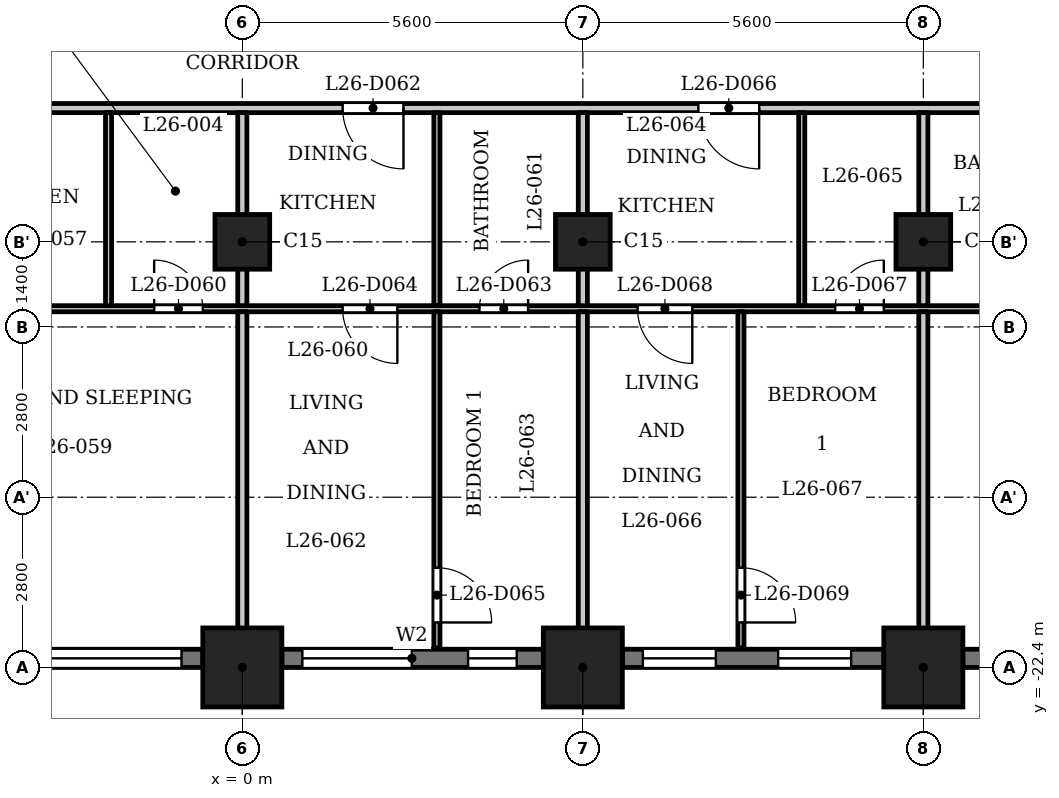
"""IFC4 building model, lengths in metres.
Left out: names, types, materials, properties, quantities, classifications, styles, units other than length and angle.
Written with IfcOpenShell. Run it as: python <this file> out.ifc"""

import sys

from ifc_helpers import new_model, si_unit, direction, frame, frame_2d, origin, origin_2d, place, context, subcontext, project, spatial, rectangle, extrude, element, fill, save


model = new_model("IFC4")
c1 = context("Model", 3, precision=1e-05, world=origin(), true_north=direction((0.0, 1.0)))
c2 = subcontext(c1, "Body", "Model", "MODEL_VIEW")
j1 = project(units=[si_unit("LENGTHUNIT", "METRE"), si_unit("PLANEANGLEUNIT", "RADIAN")], contexts=[c1])
p1 = place(None, origin())
s1 = spatial("IfcSite", under=j1, at=p1, CompositionType="ELEMENT")
p2 = place(p1, origin())
s2 = spatial("IfcBuilding", under=s1, at=p2, CompositionType="ELEMENT")
p3 = place(p2, frame((0.0, 0.0, 104.3)))
s3 = spatial("IfcBuildingStorey", under=s2, at=p3, CompositionType="ELEMENT", Elevation=104.3)
for number, where, z_axis, x_axis in (
    (1, (0.0, -22.4, 0.0), (0.0, 0.0, 1.0), (1.0, 0.0, 0.0)),
    (2, (5.6, -22.4, 0.0), (0.0, 0.0, 1.0), (1.0, 0.0, 0.0)),
    (3, (11.2, -22.4, 0.0), (0.0, 0.0, 1.0), (1.0, 0.0, 0.0)),
):
    element("IfcColumn", number, at=place(p3, frame(where, z_axis=z_axis, x_axis=x_axis)), inside=s3, PredefinedType="COLUMN", context=c2, shape_type="SweptSolid", body=[
        extrude(rectangle(XDim=1.3, YDim=1.3, at=origin_2d()), origin(), (0.0, 0.0, 1.0), 3.5),
    ])
for number, where, z_axis, x_axis in (
    (4, (0.0, -15.4, 0.0), (0.0, 0.0, 1.0), (1.0, 0.0, 0.0)),
    (5, (5.6, -15.4, 0.0), (0.0, 0.0, 1.0), (1.0, 0.0, 0.0)),
    (6, (11.2, -15.4, 0.0), (0.0, 0.0, 1.0), (1.0, 0.0, 0.0)),
):
    element("IfcColumn", number, at=place(p3, frame(where, z_axis=z_axis, x_axis=x_axis)), inside=s3, PredefinedType="COLUMN", context=c2, shape_type="SweptSolid", body=[
        extrude(rectangle(XDim=0.9, YDim=0.9, at=origin_2d()), origin(), (0.0, 0.0, 1.0), 3.5),
    ])
p4 = place(p3, frame((-4.95, -22.25, 0.0), z_axis=(0.0, 0.0, 1.0), x_axis=(1.0, 0.0, 0.0)))
e7 = element("IfcWall", 7, at=p4, inside=s3, PredefinedType="SOLIDWALL", context=c2, shape_type="SweptSolid", body=[
    extrude(rectangle(XDim=4.3, YDim=0.3, at=frame_2d((2.15, 0.0))), origin(), (0.0, 0.0, 1.0), 2.4),
])
p5 = place(p4, frame((0.35, 0.0, 1.2)))
e8 = element("IfcOpeningElement", 8, at=p5, cuts=e7, PredefinedType="OPENING", context=c2, shape_type="SweptSolid", body=[
    extrude(rectangle(XDim=3.6, YDim=0.95, at=frame_2d((1.8, 0.475))), frame((0.0, 0.16, 0.0), z_axis=(0.0, -1.0, 0.0), x_axis=(1.0, 0.0, 0.0)), (0.0, 0.0, 1.0), 0.32),
])
p6 = place(p3, frame((0.65, -22.25, 0.0), z_axis=(0.0, 0.0, 1.0), x_axis=(1.0, 0.0, 0.0)))
e9 = element("IfcWall", 9, at=p6, inside=s3, PredefinedType="SOLIDWALL", context=c2, shape_type="SweptSolid", body=[
    extrude(rectangle(XDim=4.3, YDim=0.3, at=frame_2d((2.15, 0.0))), origin(), (0.0, 0.0, 1.0), 2.4),
])
p7 = place(p6, frame((0.337, 0.0, 0.9)))
e10 = element("IfcOpeningElement", 10, at=p7, cuts=e9, PredefinedType="OPENING", context=c2, shape_type="SweptSolid", body=[
    extrude(rectangle(XDim=1.8, YDim=1.25, at=frame_2d((0.9, 0.625))), frame((0.0, 0.16, 0.0), z_axis=(0.0, -1.0, 0.0), x_axis=(1.0, 0.0, 0.0)), (0.0, 0.0, 1.0), 0.32),
])
p8 = place(p6, frame((3.062, 0.0, 0.6)))
e11 = element("IfcOpeningElement", 11, at=p8, cuts=e9, PredefinedType="OPENING", context=c2, shape_type="SweptSolid", body=[
    extrude(rectangle(XDim=0.8, YDim=1.55, at=frame_2d((0.4, 0.775))), frame((0.0, 0.16, 0.0), z_axis=(0.0, -1.0, 0.0), x_axis=(1.0, 0.0, 0.0)), (0.0, 0.0, 1.0), 0.32),
])
p9 = place(p3, frame((6.25, -22.25, 0.0), z_axis=(0.0, 0.0, 1.0), x_axis=(1.0, 0.0, 0.0)))
e12 = element("IfcWall", 12, at=p9, inside=s3, PredefinedType="SOLIDWALL", context=c2, shape_type="SweptSolid", body=[
    extrude(rectangle(XDim=4.3, YDim=0.3, at=frame_2d((2.15, 0.0))), origin(), (0.0, 0.0, 1.0), 2.4),
])
p10 = place(p9, frame((0.337, 0.0, 0.6)))
e13 = element("IfcOpeningElement", 13, at=p10, cuts=e12, PredefinedType="OPENING", context=c2, shape_type="SweptSolid", body=[
    extrude(rectangle(XDim=1.2, YDim=1.55, at=frame_2d((0.6, 0.775))), frame((0.0, 0.16, 0.0), z_axis=(0.0, -1.0, 0.0), x_axis=(1.0, 0.0, 0.0)), (0.0, 0.0, 1.0), 0.32),
])
p11 = place(p9, frame((2.562, 0.0, 0.6)))
e14 = element("IfcOpeningElement", 14, at=p11, cuts=e12, PredefinedType="OPENING", context=c2, shape_type="SweptSolid", body=[
    extrude(rectangle(XDim=1.2, YDim=1.55, at=frame_2d((0.6, 0.775))), frame((0.0, 0.16, 0.0), z_axis=(0.0, -1.0, 0.0), x_axis=(1.0, 0.0, 0.0)), (0.0, 0.0, 1.0), 0.32),
])
p12 = place(p3, frame((11.85, -22.25, 0.0), z_axis=(0.0, 0.0, 1.0), x_axis=(1.0, 0.0, 0.0)))
e15 = element("IfcWall", 15, at=p12, inside=s3, PredefinedType="SOLIDWALL", context=c2, shape_type="SweptSolid", body=[
    extrude(rectangle(XDim=4.3, YDim=0.3, at=frame_2d((2.15, 0.0))), origin(), (0.0, 0.0, 1.0), 2.4),
])
p13 = place(p12, frame((0.35, 0.0, 1.2)))
e16 = element("IfcOpeningElement", 16, at=p13, cuts=e15, PredefinedType="OPENING", context=c2, shape_type="SweptSolid", body=[
    extrude(rectangle(XDim=3.6, YDim=0.95, at=frame_2d((1.8, 0.475))), frame((0.0, 0.16, 0.0), z_axis=(0.0, -1.0, 0.0), x_axis=(1.0, 0.0, 0.0)), (0.0, 0.0, 1.0), 0.32),
])
p14 = place(p3, frame((-16.725, -16.5, 0.0), z_axis=(0.0, 0.0, 1.0), x_axis=(1.0, 0.0, 0.0)))
e17 = element("IfcWall", 17, at=p14, inside=s3, PredefinedType="PARTITIONING", context=c2, shape_type="SweptSolid", body=[
    extrude(rectangle(XDim=33.45, YDim=0.1, at=frame_2d((16.725, 0.0))), origin(), (0.0, 0.0, 1.0), 3.2),
])
p15 = place(p14, frame((4.075, 0.0, 0.0)))
e18 = element("IfcOpeningElement", 18, at=p15, cuts=e17, PredefinedType="OPENING", context=c2, shape_type="SweptSolid", body=[
    extrude(rectangle(XDim=0.8, YDim=2.1, at=frame_2d((0.4, 1.05))), frame((0.0, 0.06, 0.0), z_axis=(0.0, -1.0, 0.0), x_axis=(1.0, 0.0, 0.0)), (0.0, 0.0, 1.0), 0.12),
])
p16 = place(p14, frame((1.075, 0.0, 0.0)))
e19 = element("IfcOpeningElement", 19, at=p16, cuts=e17, PredefinedType="OPENING", context=c2, shape_type="SweptSolid", body=[
    extrude(rectangle(XDim=0.9, YDim=2.1, at=frame_2d((0.45, 1.05))), frame((0.0, 0.06, 0.0), z_axis=(0.0, -1.0, 0.0), x_axis=(1.0, 0.0, 0.0)), (0.0, 0.0, 1.0), 0.12),
])
p17 = place(p14, frame((9.675, 0.0, 0.0)))
e20 = element("IfcOpeningElement", 20, at=p17, cuts=e17, PredefinedType="OPENING", context=c2, shape_type="SweptSolid", body=[
    extrude(rectangle(XDim=0.8, YDim=2.1, at=frame_2d((0.4, 1.05))), frame((0.0, 0.06, 0.0), z_axis=(0.0, -1.0, 0.0), x_axis=(1.0, 0.0, 0.0)), (0.0, 0.0, 1.0), 0.12),
])
p18 = place(p14, frame((7.675, 0.0, 0.0)))
e21 = element("IfcOpeningElement", 21, at=p18, cuts=e17, PredefinedType="OPENING", context=c2, shape_type="SweptSolid", body=[
    extrude(rectangle(XDim=0.9, YDim=2.1, at=frame_2d((0.45, 1.05))), frame((0.0, 0.06, 0.0), z_axis=(0.0, -1.0, 0.0), x_axis=(1.0, 0.0, 0.0)), (0.0, 0.0, 1.0), 0.12),
])
p19 = place(p14, frame((15.275, 0.0, 0.0)))
e22 = element("IfcOpeningElement", 22, at=p19, cuts=e17, PredefinedType="OPENING", context=c2, shape_type="SweptSolid", body=[
    extrude(rectangle(XDim=0.8, YDim=2.1, at=frame_2d((0.4, 1.05))), frame((0.0, 0.06, 0.0), z_axis=(0.0, -1.0, 0.0), x_axis=(1.0, 0.0, 0.0)), (0.0, 0.0, 1.0), 0.12),
])
p20 = place(p14, frame((11.775, 0.0, 0.0)))
e23 = element("IfcOpeningElement", 23, at=p20, cuts=e17, PredefinedType="OPENING", context=c2, shape_type="SweptSolid", body=[
    extrude(rectangle(XDim=0.9, YDim=2.1, at=frame_2d((0.45, 1.05))), frame((0.0, 0.06, 0.0), z_axis=(0.0, -1.0, 0.0), x_axis=(1.0, 0.0, 0.0)), (0.0, 0.0, 1.0), 0.12),
])
p21 = place(p14, frame((20.625, 0.0, 0.0)))
e24 = element("IfcOpeningElement", 24, at=p21, cuts=e17, PredefinedType="OPENING", context=c2, shape_type="SweptSolid", body=[
    extrude(rectangle(XDim=0.8, YDim=2.1, at=frame_2d((0.4, 1.05))), frame((0.0, 0.06, 0.0), z_axis=(0.0, -1.0, 0.0), x_axis=(1.0, 0.0, 0.0)), (0.0, 0.0, 1.0), 0.12),
])
p22 = place(p14, frame((18.375, 0.0, 0.0)))
e25 = element("IfcOpeningElement", 25, at=p22, cuts=e17, PredefinedType="OPENING", context=c2, shape_type="SweptSolid", body=[
    extrude(rectangle(XDim=0.9, YDim=2.1, at=frame_2d((0.45, 1.05))), frame((0.0, 0.06, 0.0), z_axis=(0.0, -1.0, 0.0), x_axis=(1.0, 0.0, 0.0)), (0.0, 0.0, 1.0), 0.12),
])
p23 = place(p14, frame((26.475, 0.0, 0.0)))
e26 = element("IfcOpeningElement", 26, at=p23, cuts=e17, PredefinedType="OPENING", context=c2, shape_type="SweptSolid", body=[
    extrude(rectangle(XDim=0.8, YDim=2.1, at=frame_2d((0.4, 1.05))), frame((0.0, 0.06, 0.0), z_axis=(0.0, -1.0, 0.0), x_axis=(1.0, 0.0, 0.0)), (0.0, 0.0, 1.0), 0.12),
])
p24 = place(p14, frame((23.225, 0.0, 0.0)))
e27 = element("IfcOpeningElement", 27, at=p24, cuts=e17, PredefinedType="OPENING", context=c2, shape_type="SweptSolid", body=[
    extrude(rectangle(XDim=0.9, YDim=2.1, at=frame_2d((0.45, 1.05))), frame((0.0, 0.06, 0.0), z_axis=(0.0, -1.0, 0.0), x_axis=(1.0, 0.0, 0.0)), (0.0, 0.0, 1.0), 0.12),
])
p25 = place(p14, frame((29.475, 0.0, 0.0)))
e28 = element("IfcOpeningElement", 28, at=p25, cuts=e17, PredefinedType="OPENING", context=c2, shape_type="SweptSolid", body=[
    extrude(rectangle(XDim=0.8, YDim=2.1, at=frame_2d((0.4, 1.05))), frame((0.0, 0.06, 0.0), z_axis=(0.0, -1.0, 0.0), x_axis=(1.0, 0.0, 0.0)), (0.0, 0.0, 1.0), 0.12),
])
p26 = place(p14, frame((31.825, 0.0, 0.0)))
e29 = element("IfcOpeningElement", 29, at=p26, cuts=e17, PredefinedType="OPENING", context=c2, shape_type="SweptSolid", body=[
    extrude(rectangle(XDim=0.9, YDim=2.1, at=frame_2d((0.45, 1.05))), frame((0.0, 0.06, 0.0), z_axis=(0.0, -1.0, 0.0), x_axis=(1.0, 0.0, 0.0)), (0.0, 0.0, 1.0), 0.12),
])
p27 = place(p3, frame((-17.4, -13.2, 0.0), z_axis=(0.0, 0.0, 1.0), x_axis=(1.0, 0.0, 0.0)))
e30 = element("IfcWall", 30, at=p27, inside=s3, PredefinedType="PARTITIONING", context=c2, shape_type="SweptSolid", body=[
    extrude(rectangle(XDim=34.8, YDim=0.15, at=frame_2d((17.4, 0.0))), origin(), (0.0, 0.0, 1.0), 3.2),
])
p28 = place(p27, frame((0.15, 0.0, 0.0)))
e31 = element("IfcOpeningElement", 31, at=p28, cuts=e30, PredefinedType="OPENING", context=c2, shape_type="SweptSolid", body=[
    extrude(rectangle(XDim=1.0, YDim=2.1, at=frame_2d((0.5, 1.05))), frame((0.0, 0.085, 0.0), z_axis=(0.0, -1.0, 0.0), x_axis=(1.0, 0.0, 0.0)), (0.0, 0.0, 1.0), 0.17),
])
p29 = place(p27, frame((33.55, 0.0, 0.0)))
e32 = element("IfcOpeningElement", 32, at=p29, cuts=e30, PredefinedType="OPENING", context=c2, shape_type="SweptSolid", body=[
    extrude(rectangle(XDim=1.0, YDim=2.1, at=frame_2d((0.5, 1.05))), frame((0.0, 0.085, 0.0), z_axis=(0.0, -1.0, 0.0), x_axis=(1.0, 0.0, 0.0)), (0.0, 0.0, 1.0), 0.17),
])
p30 = place(p27, frame((8.1, 0.0, 0.0)))
e33 = element("IfcOpeningElement", 33, at=p30, cuts=e30, PredefinedType="OPENING", context=c2, shape_type="SweptSolid", body=[
    extrude(rectangle(XDim=1.0, YDim=2.1, at=frame_2d((0.5, 1.05))), frame((0.0, 0.085, 0.0), z_axis=(0.0, -1.0, 0.0), x_axis=(1.0, 0.0, 0.0)), (0.0, 0.0, 1.0), 0.17),
])
p31 = place(p27, frame((12.45, 0.0, 0.0)))
e34 = element("IfcOpeningElement", 34, at=p31, cuts=e30, PredefinedType="OPENING", context=c2, shape_type="SweptSolid", body=[
    extrude(rectangle(XDim=1.0, YDim=2.1, at=frame_2d((0.5, 1.05))), frame((0.0, 0.085, 0.0), z_axis=(0.0, -1.0, 0.0), x_axis=(1.0, 0.0, 0.0)), (0.0, 0.0, 1.0), 0.17),
])
p32 = place(p27, frame((19.05, 0.0, 0.0)))
e35 = element("IfcOpeningElement", 35, at=p32, cuts=e30, PredefinedType="OPENING", context=c2, shape_type="SweptSolid", body=[
    extrude(rectangle(XDim=1.0, YDim=2.1, at=frame_2d((0.5, 1.05))), frame((0.0, 0.085, 0.0), z_axis=(0.0, -1.0, 0.0), x_axis=(1.0, 0.0, 0.0)), (0.0, 0.0, 1.0), 0.17),
])
p33 = place(p27, frame((24.9, 0.0, 0.0)))
e36 = element("IfcOpeningElement", 36, at=p33, cuts=e30, PredefinedType="OPENING", context=c2, shape_type="SweptSolid", body=[
    extrude(rectangle(XDim=1.0, YDim=2.1, at=frame_2d((0.5, 1.05))), frame((0.0, 0.085, 0.0), z_axis=(0.0, -1.0, 0.0), x_axis=(1.0, 0.0, 0.0)), (0.0, 0.0, 1.0), 0.17),
])
p34 = place(p3, frame((-2.2, -16.45, 0.0), z_axis=(0.0, 0.0, 1.0), x_axis=(0.0, 1.0, 0.0)))
e37 = element("IfcWall", 37, at=p34, inside=s3, PredefinedType="PARTITIONING", context=c2, shape_type="SweptSolid", body=[
    extrude(rectangle(XDim=3.175, YDim=0.1, at=frame_2d((1.587, 0.0))), origin(), (0.0, 0.0, 1.0), 3.2),
])
p35 = place(p3, frame((0.0, -23.03, 0.0), z_axis=(0.0, 0.0, 1.0), x_axis=(0.0, 1.0, 0.0)))
e38 = element("IfcWall", 38, at=p35, inside=s3, PredefinedType="PARTITIONING", context=c2, shape_type="SweptSolid", body=[
    extrude(rectangle(XDim=6.48, YDim=0.15, at=frame_2d((3.24, 0.0))), origin(), (0.0, 0.0, 1.0), 3.2),
])
p36 = place(p3, frame((0.0, -16.45, 0.0), z_axis=(0.0, 0.0, 1.0), x_axis=(0.0, 1.0, 0.0)))
e39 = element("IfcWall", 39, at=p36, inside=s3, PredefinedType="PARTITIONING", context=c2, shape_type="SweptSolid", body=[
    extrude(rectangle(XDim=3.175, YDim=0.15, at=frame_2d((1.587, 0.0))), origin(), (0.0, 0.0, 1.0), 3.2),
])
p37 = place(p3, frame((3.2, -22.08, 0.0), z_axis=(0.0, 0.0, 1.0), x_axis=(0.0, 1.0, 0.0)))
e40 = element("IfcWall", 40, at=p37, inside=s3, PredefinedType="PARTITIONING", context=c2, shape_type="SweptSolid", body=[
    extrude(rectangle(XDim=5.53, YDim=0.1, at=frame_2d((2.765, 0.0))), origin(), (0.0, 0.0, 1.0), 3.2),
])
p38 = place(p37, frame((0.42, 0.0, 0.0)))
e41 = element("IfcOpeningElement", 41, at=p38, cuts=e40, PredefinedType="OPENING", context=c2, shape_type="SweptSolid", body=[
    extrude(rectangle(XDim=0.9, YDim=2.1, at=frame_2d((0.45, 1.05))), frame((0.0, 0.06, 0.0), z_axis=(0.0, -1.0, 0.0), x_axis=(1.0, 0.0, 0.0)), (0.0, 0.0, 1.0), 0.12),
])
p39 = place(p3, frame((3.2, -16.45, 0.0), z_axis=(0.0, 0.0, 1.0), x_axis=(0.0, 1.0, 0.0)))
e42 = element("IfcWall", 42, at=p39, inside=s3, PredefinedType="PARTITIONING", context=c2, shape_type="SweptSolid", body=[
    extrude(rectangle(XDim=3.175, YDim=0.1, at=frame_2d((1.587, 0.0))), origin(), (0.0, 0.0, 1.0), 3.2),
])
p40 = place(p3, frame((5.6, -23.03, 0.0), z_axis=(0.0, 0.0, 1.0), x_axis=(0.0, 1.0, 0.0)))
e43 = element("IfcWall", 43, at=p40, inside=s3, PredefinedType="PARTITIONING", context=c2, shape_type="SweptSolid", body=[
    extrude(rectangle(XDim=6.48, YDim=0.15, at=frame_2d((3.24, 0.0))), origin(), (0.0, 0.0, 1.0), 3.2),
])
p41 = place(p3, frame((5.6, -16.45, 0.0), z_axis=(0.0, 0.0, 1.0), x_axis=(0.0, 1.0, 0.0)))
e44 = element("IfcWall", 44, at=p41, inside=s3, PredefinedType="PARTITIONING", context=c2, shape_type="SweptSolid", body=[
    extrude(rectangle(XDim=3.175, YDim=0.15, at=frame_2d((1.587, 0.0))), origin(), (0.0, 0.0, 1.0), 3.2),
])
p42 = place(p3, frame((8.2, -22.08, 0.0), z_axis=(0.0, 0.0, 1.0), x_axis=(0.0, 1.0, 0.0)))
e45 = element("IfcWall", 45, at=p42, inside=s3, PredefinedType="PARTITIONING", context=c2, shape_type="SweptSolid", body=[
    extrude(rectangle(XDim=5.53, YDim=0.1, at=frame_2d((2.765, 0.0))), origin(), (0.0, 0.0, 1.0), 3.2),
])
p43 = place(p42, frame((0.42, 0.0, 0.0)))
e46 = element("IfcOpeningElement", 46, at=p43, cuts=e45, PredefinedType="OPENING", context=c2, shape_type="SweptSolid", body=[
    extrude(rectangle(XDim=0.9, YDim=2.1, at=frame_2d((0.45, 1.05))), frame((0.0, 0.06, 0.0), z_axis=(0.0, -1.0, 0.0), x_axis=(1.0, 0.0, 0.0)), (0.0, 0.0, 1.0), 0.12),
])
p44 = place(p3, frame((9.2, -16.45, 0.0), z_axis=(0.0, 0.0, 1.0), x_axis=(0.0, 1.0, 0.0)))
e47 = element("IfcWall", 47, at=p44, inside=s3, PredefinedType="PARTITIONING", context=c2, shape_type="SweptSolid", body=[
    extrude(rectangle(XDim=3.175, YDim=0.1, at=frame_2d((1.587, 0.0))), origin(), (0.0, 0.0, 1.0), 3.2),
])
p45 = place(p3, frame((11.2, -23.03, 0.0), z_axis=(0.0, 0.0, 1.0), x_axis=(0.0, 1.0, 0.0)))
e48 = element("IfcWall", 48, at=p45, inside=s3, PredefinedType="PARTITIONING", context=c2, shape_type="SweptSolid", body=[
    extrude(rectangle(XDim=6.48, YDim=0.15, at=frame_2d((3.24, 0.0))), origin(), (0.0, 0.0, 1.0), 3.2),
])
p46 = place(p3, frame((11.2, -16.45, 0.0), z_axis=(0.0, 0.0, 1.0), x_axis=(0.0, 1.0, 0.0)))
e49 = element("IfcWall", 49, at=p46, inside=s3, PredefinedType="PARTITIONING", context=c2, shape_type="SweptSolid", body=[
    extrude(rectangle(XDim=3.175, YDim=0.15, at=frame_2d((1.587, 0.0))), origin(), (0.0, 0.0, 1.0), 3.2),
])
p47 = place(p19, origin())
e50 = element("IfcDoor", 50, at=p47, inside=s3, OperationType="SINGLE_SWING_RIGHT", PredefinedType="DOOR", context=c2, shape_type="SweptSolid", body=[
    extrude(rectangle(XDim=0.8, YDim=2.1, at=frame_2d((0.4, 1.05))), frame((0.0, 0.025, 0.0), z_axis=(0.0, -1.0, 0.0), x_axis=(1.0, 0.0, 0.0)), (0.0, 0.0, 1.0), 0.05),
])
fill(e22, e50)
p48 = place(p32, origin())
e51 = element("IfcDoor", 51, at=p48, inside=s3, OperationType="SINGLE_SWING_RIGHT", PredefinedType="DOOR", context=c2, shape_type="SweptSolid", body=[
    extrude(rectangle(XDim=1.0, YDim=2.1, at=frame_2d((0.5, 1.05))), frame((0.0, 0.025, 0.0), z_axis=(0.0, -1.0, 0.0), x_axis=(1.0, 0.0, 0.0)), (0.0, 0.0, 1.0), 0.05),
])
fill(e35, e51)
p49 = place(p21, origin())
e52 = element("IfcDoor", 52, at=p49, inside=s3, OperationType="SINGLE_SWING_LEFT", PredefinedType="DOOR", context=c2, shape_type="SweptSolid", body=[
    extrude(rectangle(XDim=0.8, YDim=2.1, at=frame_2d((0.4, 1.05))), frame((0.0, 0.025, 0.0), z_axis=(0.0, -1.0, 0.0), x_axis=(1.0, 0.0, 0.0)), (0.0, 0.0, 1.0), 0.05),
])
fill(e24, e52)
p50 = place(p22, origin())
e53 = element("IfcDoor", 53, at=p50, inside=s3, OperationType="SINGLE_SWING_RIGHT", PredefinedType="DOOR", context=c2, shape_type="SweptSolid", body=[
    extrude(rectangle(XDim=0.9, YDim=2.1, at=frame_2d((0.45, 1.05))), frame((0.0, 0.025, 0.0), z_axis=(0.0, -1.0, 0.0), x_axis=(1.0, 0.0, 0.0)), (0.0, 0.0, 1.0), 0.05),
])
fill(e25, e53)
p51 = place(p38, origin())
e54 = element("IfcDoor", 54, at=p51, inside=s3, OperationType="SINGLE_SWING_LEFT", PredefinedType="DOOR", context=c2, shape_type="SweptSolid", body=[
    extrude(rectangle(XDim=0.9, YDim=2.1, at=frame_2d((0.45, 1.05))), frame((0.0, 0.025, 0.0), z_axis=(0.0, -1.0, 0.0), x_axis=(1.0, 0.0, 0.0)), (0.0, 0.0, 1.0), 0.05),
])
fill(e41, e54)
p52 = place(p33, origin())
e55 = element("IfcDoor", 55, at=p52, inside=s3, OperationType="SINGLE_SWING_RIGHT", PredefinedType="DOOR", context=c2, shape_type="SweptSolid", body=[
    extrude(rectangle(XDim=1.0, YDim=2.1, at=frame_2d((0.5, 1.05))), frame((0.0, 0.025, 0.0), z_axis=(0.0, -1.0, 0.0), x_axis=(1.0, 0.0, 0.0)), (0.0, 0.0, 1.0), 0.05),
])
fill(e36, e55)
p53 = place(p23, origin())
e56 = element("IfcDoor", 56, at=p53, inside=s3, OperationType="SINGLE_SWING_LEFT", PredefinedType="DOOR", context=c2, shape_type="SweptSolid", body=[
    extrude(rectangle(XDim=0.8, YDim=2.1, at=frame_2d((0.4, 1.05))), frame((0.0, 0.025, 0.0), z_axis=(0.0, -1.0, 0.0), x_axis=(1.0, 0.0, 0.0)), (0.0, 0.0, 1.0), 0.05),
])
fill(e26, e56)
p54 = place(p24, origin())
e57 = element("IfcDoor", 57, at=p54, inside=s3, OperationType="SINGLE_SWING_RIGHT", PredefinedType="DOOR", context=c2, shape_type="SweptSolid", body=[
    extrude(rectangle(XDim=0.9, YDim=2.1, at=frame_2d((0.45, 1.05))), frame((0.0, 0.025, 0.0), z_axis=(0.0, -1.0, 0.0), x_axis=(1.0, 0.0, 0.0)), (0.0, 0.0, 1.0), 0.05),
])
fill(e27, e57)
p55 = place(p43, origin())
e58 = element("IfcDoor", 58, at=p55, inside=s3, OperationType="SINGLE_SWING_LEFT", PredefinedType="DOOR", context=c2, shape_type="SweptSolid", body=[
    extrude(rectangle(XDim=0.9, YDim=2.1, at=frame_2d((0.45, 1.05))), frame((0.0, 0.025, 0.0), z_axis=(0.0, -1.0, 0.0), x_axis=(1.0, 0.0, 0.0)), (0.0, 0.0, 1.0), 0.05),
])
fill(e46, e58)
p56 = place(p5, origin())
e59 = element("IfcWindow", 59, at=p56, inside=s3, PartitioningType="SINGLE_PANEL", PredefinedType="WINDOW", context=c2, shape_type="SweptSolid", body=[
    extrude(rectangle(XDim=3.6, YDim=0.95, at=frame_2d((1.8, 0.475))), frame((0.0, 0.03, 0.0), z_axis=(0.0, -1.0, 0.0), x_axis=(1.0, 0.0, 0.0)), (0.0, 0.0, 1.0), 0.06),
])
fill(e8, e59)
p57 = place(p7, origin())
e60 = element("IfcWindow", 60, at=p57, inside=s3, PartitioningType="SINGLE_PANEL", PredefinedType="WINDOW", context=c2, shape_type="SweptSolid", body=[
    extrude(rectangle(XDim=1.8, YDim=1.25, at=frame_2d((0.9, 0.625))), frame((0.0, 0.03, 0.0), z_axis=(0.0, -1.0, 0.0), x_axis=(1.0, 0.0, 0.0)), (0.0, 0.0, 1.0), 0.06),
])
fill(e10, e60)
p58 = place(p8, origin())
e61 = element("IfcWindow", 61, at=p58, inside=s3, PartitioningType="SINGLE_PANEL", PredefinedType="WINDOW", context=c2, shape_type="SweptSolid", body=[
    extrude(rectangle(XDim=0.8, YDim=1.55, at=frame_2d((0.4, 0.775))), frame((0.0, 0.03, 0.0), z_axis=(0.0, -1.0, 0.0), x_axis=(1.0, 0.0, 0.0)), (0.0, 0.0, 1.0), 0.06),
])
fill(e11, e61)
p59 = place(p10, origin())
e62 = element("IfcWindow", 62, at=p59, inside=s3, PartitioningType="SINGLE_PANEL", PredefinedType="WINDOW", context=c2, shape_type="SweptSolid", body=[
    extrude(rectangle(XDim=1.2, YDim=1.55, at=frame_2d((0.6, 0.775))), frame((0.0, 0.03, 0.0), z_axis=(0.0, -1.0, 0.0), x_axis=(1.0, 0.0, 0.0)), (0.0, 0.0, 1.0), 0.06),
])
fill(e13, e62)
p60 = place(p11, origin())
e63 = element("IfcWindow", 63, at=p60, inside=s3, PartitioningType="SINGLE_PANEL", PredefinedType="WINDOW", context=c2, shape_type="SweptSolid", body=[
    extrude(rectangle(XDim=1.2, YDim=1.55, at=frame_2d((0.6, 0.775))), frame((0.0, 0.03, 0.0), z_axis=(0.0, -1.0, 0.0), x_axis=(1.0, 0.0, 0.0)), (0.0, 0.0, 1.0), 0.06),
])
fill(e14, e63)
save(model, sys.argv[1])
